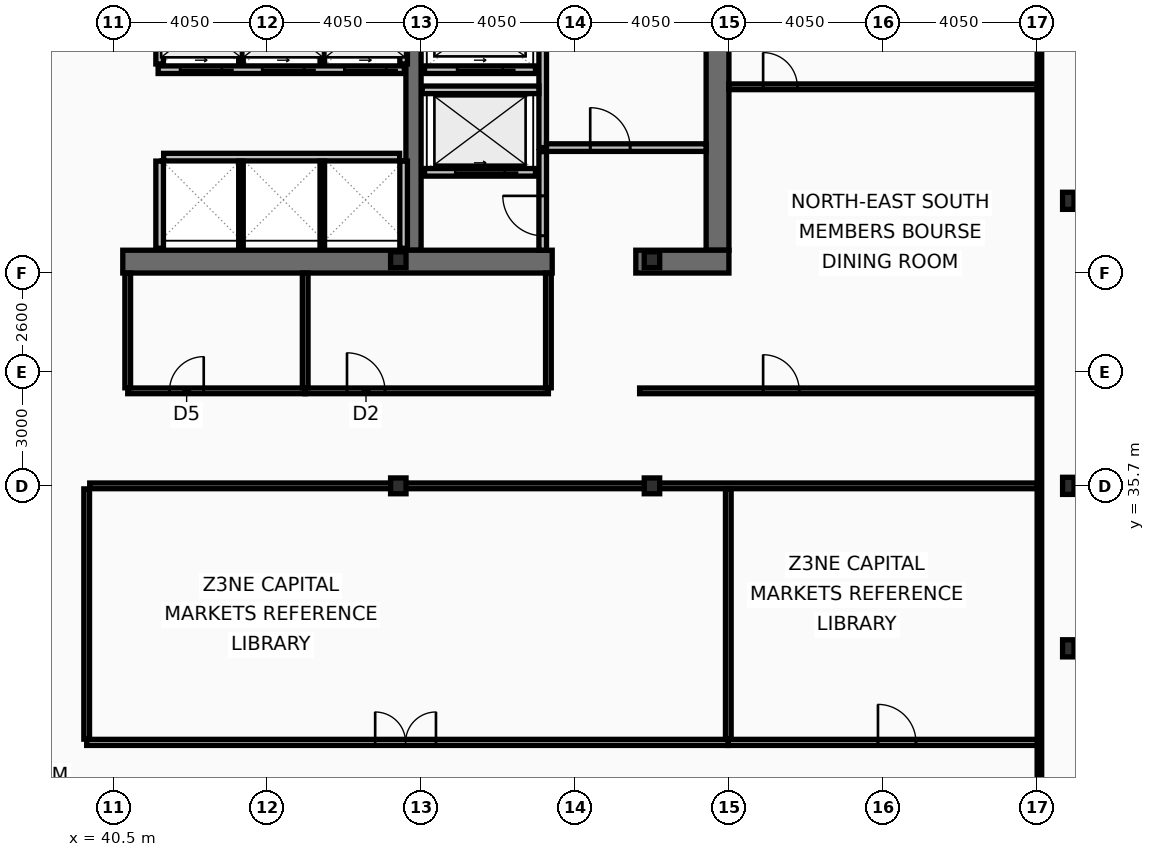
"""IFC4 building model, lengths in metres.
Left out: names, types, materials, properties, quantities, classifications, styles, units other than length and angle.
Written with IfcOpenShell. Run it as: python <this file> out.ifc"""

import sys

from ifc_helpers import new_model, si_unit, direction, frame, frame_2d, origin, origin_2d, place, context, subcontext, project, spatial, rectangle, i_section, extrude, element, fill, save


model = new_model("IFC4")
c1 = context("Model", 3, precision=1e-05, world=origin(), true_north=direction((0.0, 1.0)))
c2 = subcontext(c1, "Body", "Model", "MODEL_VIEW")
j1 = project(units=[si_unit("LENGTHUNIT", "METRE"), si_unit("PLANEANGLEUNIT", "RADIAN")], contexts=[c1])
p1 = place(None, origin())
s1 = spatial("IfcSite", under=j1, at=p1, CompositionType="ELEMENT")
p2 = place(p1, origin())
s2 = spatial("IfcBuilding", under=s1, at=p2, CompositionType="ELEMENT")
p3 = place(p2, frame((0.0, 0.0, 235.4)))
s3 = spatial("IfcBuildingStorey", under=s2, at=p3, CompositionType="ELEMENT", Elevation=235.4)
p4 = place(p3, frame((56.4, 53.1, 0.0), z_axis=(0.0, 0.0, 1.0), x_axis=(0.0, -1.0, 0.0)))
e1 = element("IfcWall", 1, at=p4, inside=s3, PredefinedType="SHEAR", context=c2, shape_type="SweptSolid", body=[
    extrude(rectangle(XDim=11.2, YDim=0.6, at=frame_2d((5.6, 0.0))), origin(), (0.0, 0.0, 1.0), 3.44),
])
p5 = place(p3, frame((48.4, 41.9, 0.0), z_axis=(0.0, 0.0, 1.0), x_axis=(0.0, 1.0, 0.0)))
e2 = element("IfcWall", 2, at=p5, inside=s3, PredefinedType="SHEAR", context=c2, shape_type="SweptSolid", body=[
    extrude(rectangle(XDim=11.2, YDim=0.4, at=frame_2d((5.6, 0.0))), origin(), (0.0, 0.0, 1.0), 3.44),
])
p6 = place(p3, frame((52.05, 41.6, 0.0), z_axis=(0.0, 0.0, 1.0), x_axis=(-1.0, 0.0, 0.0)))
e3 = element("IfcWall", 3, at=p6, inside=s3, PredefinedType="SHEAR", context=c2, shape_type="SweptSolid", body=[
    extrude(rectangle(XDim=11.3, YDim=0.6, at=frame_2d((5.65, 0.0))), origin(), (0.0, 0.0, 1.0), 3.44),
])
p7 = place(p3, frame((56.7, 41.6, 0.0), z_axis=(0.0, 0.0, 1.0), x_axis=(-1.0, 0.0, 0.0)))
e4 = element("IfcWall", 4, at=p7, inside=s3, PredefinedType="SHEAR", context=c2, shape_type="SweptSolid", body=[
    extrude(rectangle(XDim=2.45, YDim=0.6, at=frame_2d((1.225, 0.0))), origin(), (0.0, 0.0, 1.0), 3.44),
])
for number, where, z_axis, x_axis in (
    (5, (65.63, 31.425, 0.0), (0.0, 0.0, 1.0), (1.0, 0.0, 0.0)),
    (6, (65.63, 35.7, 0.0), (0.0, 0.0, 1.0), (1.0, 0.0, 0.0)),
    (7, (65.63, 43.2, 0.0), (0.0, 0.0, 1.0), (1.0, 0.0, 0.0)),
):
    element("IfcColumn", number, at=place(p3, frame(where, z_axis=z_axis, x_axis=x_axis)), inside=s3, PredefinedType="COLUMN", context=c2, shape_type="SweptSolid", body=[
        extrude(i_section(OverallWidth=0.3, OverallDepth=0.45, WebThickness=0.014, FlangeThickness=0.026, at=origin_2d()), origin(), (0.0, 0.0, 1.0), 3.6),
    ])
for number, where, z_axis, x_axis in (
    (8, (48.0, 35.7, 0.0), (0.0, 0.0, 1.0), (1.0, 0.0, 0.0)),
    (9, (48.0, 41.65, 0.0), (0.0, 0.0, 1.0), (1.0, 0.0, 0.0)),
    (10, (54.675, 35.7, 0.0), (0.0, 0.0, 1.0), (1.0, 0.0, 0.0)),
    (11, (54.675, 41.65, 0.0), (0.0, 0.0, 1.0), (1.0, 0.0, 0.0)),
):
    element("IfcColumn", number, at=place(p3, frame(where, z_axis=z_axis, x_axis=x_axis)), inside=s3, PredefinedType="COLUMN", context=c2, shape_type="SweptSolid", body=[
        extrude(i_section(OverallWidth=0.406, OverallDepth=0.416, WebThickness=0.03, FlangeThickness=0.048, at=origin_2d()), origin(), (0.0, 0.0, 1.0), 3.6),
    ])
p8 = place(p3, frame((51.61, 43.95, 0.0), z_axis=(0.0, 0.0, 1.0), x_axis=(-1.0, 0.0, 0.0)))
e12 = element("IfcWall", 12, at=p8, inside=s3, PredefinedType="PARTITIONING", context=c2, shape_type="SweptSolid", body=[
    extrude(rectangle(XDim=2.92, YDim=0.2, at=frame_2d((1.46, 0.0))), origin(), (0.0, 0.0, 1.0), 3.44),
])
p9 = place(p8, frame((0.81, 0.0, 0.0)))
e13 = element("IfcOpeningElement", 13, at=p9, cuts=e12, PredefinedType="OPENING", context=c2, shape_type="SweptSolid", body=[
    extrude(rectangle(XDim=1.3, YDim=2.18, at=frame_2d((0.65, 1.09))), frame((0.0, 0.11, 0.0), z_axis=(0.0, -1.0, 0.0), x_axis=(1.0, 0.0, 0.0)), (0.0, 0.0, 1.0), 0.22),
])
p10 = place(p3, frame((51.61, 46.65, 0.0), z_axis=(0.0, 0.0, 1.0), x_axis=(-1.0, 0.0, 0.0)))
e14 = element("IfcWall", 14, at=p10, inside=s3, PredefinedType="PARTITIONING", context=c2, shape_type="SweptSolid", body=[
    extrude(rectangle(XDim=2.92, YDim=0.2, at=frame_2d((1.46, 0.0))), origin(), (0.0, 0.0, 1.0), 3.44),
])
p11 = place(p10, frame((0.86, 0.0, 0.0)))
e15 = element("IfcOpeningElement", 15, at=p11, cuts=e14, PredefinedType="OPENING", context=c2, shape_type="SweptSolid", body=[
    extrude(rectangle(XDim=1.2, YDim=2.18, at=frame_2d((0.6, 1.09))), frame((0.0, 0.11, 0.0), z_axis=(0.0, -1.0, 0.0), x_axis=(1.0, 0.0, 0.0)), (0.0, 0.0, 1.0), 0.22),
])
p12 = place(p3, frame((48.16, 46.65, 0.0), z_axis=(0.0, 0.0, 1.0), x_axis=(-1.0, 0.0, 0.0)))
e16 = element("IfcWall", 16, at=p12, inside=s3, PredefinedType="PARTITIONING", context=c2, shape_type="SweptSolid", body=[
    extrude(rectangle(XDim=6.48, YDim=0.2, at=frame_2d((3.24, 0.0))), origin(), (0.0, 0.0, 1.0), 3.44),
])
p13 = place(p12, frame((4.8, 0.0, 0.0)))
e17 = element("IfcOpeningElement", 17, at=p13, cuts=e16, PredefinedType="OPENING", context=c2, shape_type="SweptSolid", body=[
    extrude(rectangle(XDim=1.1, YDim=2.18, at=frame_2d((0.55, 1.09))), frame((0.0, 0.11, 0.0), z_axis=(0.0, -1.0, 0.0), x_axis=(1.0, 0.0, 0.0)), (0.0, 0.0, 1.0), 0.22),
])
p14 = place(p12, frame((2.64, 0.0, 0.0)))
e18 = element("IfcOpeningElement", 18, at=p14, cuts=e16, PredefinedType="OPENING", context=c2, shape_type="SweptSolid", body=[
    extrude(rectangle(XDim=1.1, YDim=2.18, at=frame_2d((0.55, 1.09))), frame((0.0, 0.11, 0.0), z_axis=(0.0, -1.0, 0.0), x_axis=(1.0, 0.0, 0.0)), (0.0, 0.0, 1.0), 0.22),
])
p15 = place(p12, frame((0.48, 0.0, 0.0)))
e19 = element("IfcOpeningElement", 19, at=p15, cuts=e16, PredefinedType="OPENING", context=c2, shape_type="SweptSolid", body=[
    extrude(rectangle(XDim=1.1, YDim=2.18, at=frame_2d((0.55, 1.09))), frame((0.0, 0.11, 0.0), z_axis=(0.0, -1.0, 0.0), x_axis=(1.0, 0.0, 0.0)), (0.0, 0.0, 1.0), 0.22),
])
p16 = place(p3, frame((51.8, 44.6, 0.0), z_axis=(0.0, 0.0, 1.0), x_axis=(0.0, 1.0, 0.0)))
e20 = element("IfcWall", 20, at=p16, inside=s3, PredefinedType="PARTITIONING", context=c2, shape_type="SweptSolid", body=[
    extrude(rectangle(XDim=4.3, YDim=0.2, at=frame_2d((2.15, 0.0))), origin(), (0.0, 0.0, 1.0), 3.44),
])
p17 = place(p3, frame((51.9, 44.6, 0.0), z_axis=(0.0, 0.0, 1.0), x_axis=(1.0, 0.0, 0.0)))
e21 = element("IfcWall", 21, at=p17, inside=s3, PredefinedType="PARTITIONING", context=c2, shape_type="SweptSolid", body=[
    extrude(rectangle(XDim=4.2, YDim=0.2, at=frame_2d((2.1, 0.0))), origin(), (0.0, 0.0, 1.0), 3.44),
])
p18 = place(p17, frame((1.15, 0.0, 0.0)))
e22 = element("IfcOpeningElement", 22, at=p18, cuts=e21, PredefinedType="OPENING", context=c2, shape_type="SweptSolid", body=[
    extrude(rectangle(XDim=1.05, YDim=2.15, at=frame_2d((0.525, 1.075))), frame((0.0, 0.11, 0.0), z_axis=(0.0, -1.0, 0.0), x_axis=(1.0, 0.0, 0.0)), (0.0, 0.0, 1.0), 0.22),
])
p19 = place(p3, frame((48.63, 46.12, 0.0), z_axis=(0.0, 0.0, 1.0), x_axis=(1.0, 0.0, 0.0)))
e23 = element("IfcWall", 23, at=p19, inside=s3, PredefinedType="PARTITIONING", context=c2, shape_type="SweptSolid", body=[
    extrude(rectangle(XDim=3.07, YDim=0.2, at=frame_2d((1.535, 0.0))), origin(), (0.0, 0.0, 1.0), 3.44),
])
p20 = place(p3, frame((51.8, 41.9, 0.0), z_axis=(0.0, 0.0, 1.0), x_axis=(0.0, 1.0, 0.0)))
e24 = element("IfcWall", 24, at=p20, inside=s3, PredefinedType="PARTITIONING", context=c2, shape_type="SweptSolid", body=[
    extrude(rectangle(XDim=2.595, YDim=0.2, at=frame_2d((1.298, 0.0))), origin(), (0.0, 0.0, 1.0), 3.44),
])
p21 = place(p20, frame((0.38, 0.0, 0.0)))
e25 = element("IfcOpeningElement", 25, at=p21, cuts=e24, PredefinedType="OPENING", context=c2, shape_type="SweptSolid", body=[
    extrude(rectangle(XDim=1.05, YDim=2.15, at=frame_2d((0.525, 1.075))), frame((0.0, 0.11, 0.0), z_axis=(0.0, -1.0, 0.0), x_axis=(1.0, 0.0, 0.0)), (0.0, 0.0, 1.0), 0.22),
])
for number, where, z_axis, x_axis in (
    (26, (41.72, 46.8, 0.0), (0.0, 0.0, 1.0), (0.0, 1.0, 0.0)),
    (27, (48.14, 46.8, 0.0), (0.0, 0.0, 1.0), (0.0, 1.0, 0.0)),
):
    element("IfcWall", number, at=place(p3, frame(where, z_axis=z_axis, x_axis=x_axis)), inside=s3, PredefinedType="PARTITIONING", context=c2, shape_type="SweptSolid", body=[
        extrude(rectangle(XDim=2.095, YDim=0.2, at=frame_2d((1.047, 0.0))), origin(), (0.0, 0.0, 1.0), 3.44),
    ])
for number, where, z_axis, x_axis in (
    (28, (43.86, 46.8, 0.0), (0.0, 0.0, 1.0), (0.0, 1.0, 0.0)),
    (29, (46.0, 46.8, 0.0), (0.0, 0.0, 1.0), (0.0, 1.0, 0.0)),
):
    element("IfcWall", number, at=place(p3, frame(where, z_axis=z_axis, x_axis=x_axis)), inside=s3, PredefinedType="PARTITIONING", context=c2, shape_type="SweptSolid", body=[
        extrude(rectangle(XDim=2.095, YDim=0.12, at=frame_2d((1.047, 0.0))), origin(), (0.0, 0.0, 1.0), 3.44),
    ])
p22 = place(p3, frame((41.825, 44.35, 0.0), z_axis=(0.0, 0.0, 1.0), x_axis=(1.0, 0.0, 0.0)))
e30 = element("IfcWall", 30, at=p22, inside=s3, PredefinedType="PARTITIONING", context=c2, shape_type="SweptSolid", body=[
    extrude(rectangle(XDim=6.21, YDim=0.2, at=frame_2d((3.105, 0.0))), origin(), (0.0, 0.0, 1.0), 3.44),
])
for number, where, z_axis, x_axis in (
    (31, (41.72, 41.95, 0.0), (0.0, 0.0, 1.0), (0.0, 1.0, 0.0)),
    (32, (48.14, 41.95, 0.0), (0.0, 0.0, 1.0), (0.0, 1.0, 0.0)),
):
    element("IfcWall", number, at=place(p3, frame(where, z_axis=z_axis, x_axis=x_axis)), inside=s3, PredefinedType="PARTITIONING", context=c2, shape_type="SweptSolid", body=[
        extrude(rectangle(XDim=2.295, YDim=0.2, at=frame_2d((1.147, 0.0))), origin(), (0.0, 0.0, 1.0), 3.44),
    ])
for number, where, z_axis, x_axis in (
    (33, (43.86, 41.95, 0.0), (0.0, 0.0, 1.0), (0.0, 1.0, 0.0)),
    (34, (46.0, 41.95, 0.0), (0.0, 0.0, 1.0), (0.0, 1.0, 0.0)),
):
    element("IfcWall", number, at=place(p3, frame(where, z_axis=z_axis, x_axis=x_axis)), inside=s3, PredefinedType="PARTITIONING", context=c2, shape_type="SweptSolid", body=[
        extrude(rectangle(XDim=2.295, YDim=0.12, at=frame_2d((1.147, 0.0))), origin(), (0.0, 0.0, 1.0), 3.44),
    ])
p23 = place(p3, frame((40.88, 38.2, 0.0), z_axis=(0.0, 0.0, 1.0), x_axis=(1.0, 0.0, 0.0)))
e35 = element("IfcWall", 35, at=p23, inside=s3, PredefinedType="PARTITIONING", context=c2, shape_type="SweptSolid", body=[
    extrude(rectangle(XDim=4.67, YDim=0.15, at=frame_2d((2.335, 0.0))), origin(), (0.0, 0.0, 1.0), 2.78),
])
p24 = place(p23, frame((1.1, 0.0, 0.0)))
e36 = element("IfcOpeningElement", 36, at=p24, cuts=e35, PredefinedType="OPENING", context=c2, shape_type="SweptSolid", body=[
    extrude(rectangle(XDim=0.9, YDim=2.05, at=frame_2d((0.45, 1.025))), frame((0.0, 0.085, 0.0), z_axis=(0.0, -1.0, 0.0), x_axis=(1.0, 0.0, 0.0)), (0.0, 0.0, 1.0), 0.17),
])
p25 = place(p3, frame((45.55, 38.2, 0.0), z_axis=(0.0, 0.0, 1.0), x_axis=(1.0, 0.0, 0.0)))
e37 = element("IfcWall", 37, at=p25, inside=s3, PredefinedType="PARTITIONING", context=c2, shape_type="SweptSolid", body=[
    extrude(rectangle(XDim=6.4, YDim=0.15, at=frame_2d((3.2, 0.0))), origin(), (0.0, 0.0, 1.0), 2.78),
])
p26 = place(p25, frame((1.1, 0.0, 0.0)))
e38 = element("IfcOpeningElement", 38, at=p26, cuts=e37, PredefinedType="OPENING", context=c2, shape_type="SweptSolid", body=[
    extrude(rectangle(XDim=1.0, YDim=2.05, at=frame_2d((0.5, 1.025))), frame((0.0, 0.085, 0.0), z_axis=(0.0, -1.0, 0.0), x_axis=(1.0, 0.0, 0.0)), (0.0, 0.0, 1.0), 0.17),
])
for number, where, z_axis, x_axis in (
    (39, (40.88, 38.28, 0.0), (0.0, 0.0, 1.0), (0.0, 1.0, 0.0)),
    (40, (45.55, 38.28, 0.0), (0.0, 0.0, 1.0), (0.0, 1.0, 0.0)),
    (41, (51.95, 38.28, 0.0), (0.0, 0.0, 1.0), (0.0, 1.0, 0.0)),
):
    element("IfcWall", number, at=place(p3, frame(where, z_axis=z_axis, x_axis=x_axis)), inside=s3, PredefinedType="PARTITIONING", context=c2, shape_type="SweptSolid", body=[
        extrude(rectangle(XDim=3.02, YDim=0.15, at=frame_2d((1.51, 0.0))), origin(), (0.0, 0.0, 1.0), 3.44),
    ])
p27 = place(p3, frame((54.35, 38.2, 0.0), z_axis=(0.0, 0.0, 1.0), x_axis=(1.0, 0.0, 0.0)))
e42 = element("IfcWall", 42, at=p27, inside=s3, PredefinedType="PARTITIONING", context=c2, shape_type="SweptSolid", body=[
    extrude(rectangle(XDim=10.52, YDim=0.15, at=frame_2d((5.26, 0.0))), origin(), (0.0, 0.0, 1.0), 2.78),
])
p28 = place(p27, frame((3.25, 0.0, 0.0)))
e43 = element("IfcOpeningElement", 43, at=p28, cuts=e42, PredefinedType="OPENING", context=c2, shape_type="SweptSolid", body=[
    extrude(rectangle(XDim=0.95, YDim=2.05, at=frame_2d((0.475, 1.025))), frame((0.0, 0.085, 0.0), z_axis=(0.0, -1.0, 0.0), x_axis=(1.0, 0.0, 0.0)), (0.0, 0.0, 1.0), 0.17),
])
p29 = place(p3, frame((56.7, 46.2, 0.0), z_axis=(0.0, 0.0, 1.0), x_axis=(1.0, 0.0, 0.0)))
e44 = element("IfcWall", 44, at=p29, inside=s3, PredefinedType="PARTITIONING", context=c2, shape_type="SweptSolid", body=[
    extrude(rectangle(XDim=8.105, YDim=0.15, at=frame_2d((4.052, 0.0))), origin(), (0.0, 0.0, 1.0), 2.83),
])
p30 = place(p29, frame((0.9, 0.0, 0.0)))
e45 = element("IfcOpeningElement", 45, at=p30, cuts=e44, PredefinedType="OPENING", context=c2, shape_type="SweptSolid", body=[
    extrude(rectangle(XDim=0.9, YDim=2.05, at=frame_2d((0.45, 1.025))), frame((0.0, 0.085, 0.0), z_axis=(0.0, -1.0, 0.0), x_axis=(1.0, 0.0, 0.0)), (0.0, 0.0, 1.0), 0.17),
])
p31 = place(p3, frame((39.8, 29.035, 0.0), z_axis=(0.0, 0.0, 1.0), x_axis=(0.0, 1.0, 0.0)))
e46 = element("IfcWall", 46, at=p31, inside=s3, PredefinedType="PARTITIONING", context=c2, shape_type="SweptSolid", body=[
    extrude(rectangle(XDim=6.585, YDim=0.15, at=frame_2d((3.292, 0.0))), origin(), (0.0, 0.0, 1.0), 2.98),
])
p32 = place(p3, frame((39.88, 35.7, 0.0), z_axis=(0.0, 0.0, 1.0), x_axis=(1.0, 0.0, 0.0)))
e47 = element("IfcWall", 47, at=p32, inside=s3, PredefinedType="PARTITIONING", context=c2, shape_type="SweptSolid", body=[
    extrude(rectangle(XDim=24.925, YDim=0.15, at=frame_2d((12.462, 0.0))), origin(), (0.0, 0.0, 1.0), 2.09),
])
p33 = place(p3, frame((39.8, 28.95, 0.0), z_axis=(0.0, 0.0, 1.0), x_axis=(1.0, 0.0, 0.0)))
e48 = element("IfcWall", 48, at=p33, inside=s3, PredefinedType="PARTITIONING", context=c2, shape_type="SweptSolid", body=[
    extrude(rectangle(XDim=16.884, YDim=0.16, at=frame_2d((8.442, 0.0))), origin(), (0.0, 0.0, 1.0), 2.53),
])
p34 = place(p33, frame((7.591, 0.0, 0.0)))
e49 = element("IfcOpeningElement", 49, at=p34, cuts=e48, PredefinedType="OPENING", context=c2, shape_type="SweptSolid", body=[
    extrude(rectangle(XDim=1.6, YDim=2.15, at=frame_2d((0.8, 1.075))), frame((0.0, 0.09, 0.0), z_axis=(0.0, -1.0, 0.0), x_axis=(1.0, 0.0, 0.0)), (0.0, 0.0, 1.0), 0.18),
])
p35 = place(p3, frame((56.684, 28.95, 0.0), z_axis=(0.0, 0.0, 1.0), x_axis=(1.0, 0.0, 0.0)))
e50 = element("IfcWall", 50, at=p35, inside=s3, PredefinedType="PARTITIONING", context=c2, shape_type="SweptSolid", body=[
    extrude(rectangle(XDim=8.186, YDim=0.16, at=frame_2d((4.093, 0.0))), origin(), (0.0, 0.0, 1.0), 2.83),
])
p36 = place(p35, frame((3.938, 0.0, 0.0)))
e51 = element("IfcOpeningElement", 51, at=p36, cuts=e50, PredefinedType="OPENING", context=c2, shape_type="SweptSolid", body=[
    extrude(rectangle(XDim=1.0, YDim=2.05, at=frame_2d((0.5, 1.025))), frame((0.0, 0.09, 0.0), z_axis=(0.0, -1.0, 0.0), x_axis=(1.0, 0.0, 0.0)), (0.0, 0.0, 1.0), 0.18),
])
p37 = place(p3, frame((56.684, 29.035, 0.0), z_axis=(0.0, 0.0, 1.0), x_axis=(0.0, 1.0, 0.0)))
e52 = element("IfcWall", 52, at=p37, inside=s3, PredefinedType="PARTITIONING", context=c2, shape_type="SweptSolid", body=[
    extrude(rectangle(XDim=6.585, YDim=0.15, at=frame_2d((3.292, 0.0))), origin(), (0.0, 0.0, 1.0), 2.11),
])
p38 = place(p3, frame((64.87, 10.665, 0.0), z_axis=(0.0, 0.0, 1.0), x_axis=(0.0, 1.0, 0.0)))
e53 = element("IfcWall", 53, at=p38, inside=s3, PredefinedType="PARTITIONING", context=c2, shape_type="SweptSolid", body=[
    extrude(rectangle(XDim=42.11, YDim=0.12, at=frame_2d((21.055, 0.0))), origin(), (0.0, 0.0, 1.0), 1.83),
])
p39 = place(p9, origin())
e54 = element("IfcDoor", 54, at=p39, inside=s3, OperationType="SLIDING_TO_LEFT", PredefinedType="DOOR", context=c2, shape_type="SweptSolid", body=[
    extrude(rectangle(XDim=1.3, YDim=2.18, at=frame_2d((0.65, 1.09))), frame((0.0, 0.025, 0.0), z_axis=(0.0, -1.0, 0.0), x_axis=(1.0, 0.0, 0.0)), (0.0, 0.0, 1.0), 0.05),
])
fill(e13, e54)
p40 = place(p11, origin())
e55 = element("IfcDoor", 55, at=p40, inside=s3, OperationType="SLIDING_TO_LEFT", PredefinedType="DOOR", context=c2, shape_type="SweptSolid", body=[
    extrude(rectangle(XDim=1.2, YDim=2.18, at=frame_2d((0.6, 1.09))), frame((0.0, 0.025, 0.0), z_axis=(0.0, -1.0, 0.0), x_axis=(1.0, 0.0, 0.0)), (0.0, 0.0, 1.0), 0.05),
])
fill(e15, e55)
p41 = place(p13, origin())
e56 = element("IfcDoor", 56, at=p41, inside=s3, OperationType="SLIDING_TO_LEFT", PredefinedType="DOOR", context=c2, shape_type="SweptSolid", body=[
    extrude(rectangle(XDim=1.1, YDim=2.18, at=frame_2d((0.55, 1.09))), frame((0.0, 0.025, 0.0), z_axis=(0.0, -1.0, 0.0), x_axis=(1.0, 0.0, 0.0)), (0.0, 0.0, 1.0), 0.05),
])
fill(e17, e56)
p42 = place(p14, origin())
e57 = element("IfcDoor", 57, at=p42, inside=s3, OperationType="SLIDING_TO_LEFT", PredefinedType="DOOR", context=c2, shape_type="SweptSolid", body=[
    extrude(rectangle(XDim=1.1, YDim=2.18, at=frame_2d((0.55, 1.09))), frame((0.0, 0.025, 0.0), z_axis=(0.0, -1.0, 0.0), x_axis=(1.0, 0.0, 0.0)), (0.0, 0.0, 1.0), 0.05),
])
fill(e18, e57)
p43 = place(p15, origin())
e58 = element("IfcDoor", 58, at=p43, inside=s3, OperationType="SLIDING_TO_LEFT", PredefinedType="DOOR", context=c2, shape_type="SweptSolid", body=[
    extrude(rectangle(XDim=1.1, YDim=2.18, at=frame_2d((0.55, 1.09))), frame((0.0, 0.025, 0.0), z_axis=(0.0, -1.0, 0.0), x_axis=(1.0, 0.0, 0.0)), (0.0, 0.0, 1.0), 0.05),
])
fill(e19, e58)
p44 = place(p18, origin())
e59 = element("IfcDoor", 59, at=p44, inside=s3, OperationType="SINGLE_SWING_LEFT", PredefinedType="DOOR", context=c2, shape_type="SweptSolid", body=[
    extrude(rectangle(XDim=1.05, YDim=2.15, at=frame_2d((0.525, 1.075))), frame((0.0, 0.025, 0.0), z_axis=(0.0, -1.0, 0.0), x_axis=(1.0, 0.0, 0.0)), (0.0, 0.0, 1.0), 0.05),
])
fill(e22, e59)
p45 = place(p21, origin())
e60 = element("IfcDoor", 60, at=p45, inside=s3, OperationType="SINGLE_SWING_RIGHT", PredefinedType="DOOR", context=c2, shape_type="SweptSolid", body=[
    extrude(rectangle(XDim=1.05, YDim=2.15, at=frame_2d((0.525, 1.075))), frame((0.0, 0.025, 0.0), z_axis=(0.0, -1.0, 0.0), x_axis=(1.0, 0.0, 0.0)), (0.0, 0.0, 1.0), 0.05),
])
fill(e25, e60)
p46 = place(p24, origin())
e61 = element("IfcDoor", 61, at=p46, inside=s3, OperationType="SINGLE_SWING_RIGHT", PredefinedType="DOOR", context=c2, shape_type="SweptSolid", body=[
    extrude(rectangle(XDim=0.9, YDim=2.05, at=frame_2d((0.45, 1.025))), frame((0.0, 0.025, 0.0), z_axis=(0.0, -1.0, 0.0), x_axis=(1.0, 0.0, 0.0)), (0.0, 0.0, 1.0), 0.05),
])
fill(e36, e61)
p47 = place(p26, origin())
e62 = element("IfcDoor", 62, at=p47, inside=s3, OperationType="SINGLE_SWING_LEFT", PredefinedType="DOOR", context=c2, shape_type="SweptSolid", body=[
    extrude(rectangle(XDim=1.0, YDim=2.05, at=frame_2d((0.5, 1.025))), frame((0.0, 0.025, 0.0), z_axis=(0.0, -1.0, 0.0), x_axis=(1.0, 0.0, 0.0)), (0.0, 0.0, 1.0), 0.05),
])
fill(e38, e62)
p48 = place(p28, origin())
e63 = element("IfcDoor", 63, at=p48, inside=s3, OperationType="SINGLE_SWING_LEFT", PredefinedType="DOOR", context=c2, shape_type="SweptSolid", body=[
    extrude(rectangle(XDim=0.95, YDim=2.05, at=frame_2d((0.475, 1.025))), frame((0.0, 0.025, 0.0), z_axis=(0.0, -1.0, 0.0), x_axis=(1.0, 0.0, 0.0)), (0.0, 0.0, 1.0), 0.05),
])
fill(e43, e63)
p49 = place(p30, origin())
e64 = element("IfcDoor", 64, at=p49, inside=s3, OperationType="SINGLE_SWING_LEFT", PredefinedType="DOOR", context=c2, shape_type="SweptSolid", body=[
    extrude(rectangle(XDim=0.9, YDim=2.05, at=frame_2d((0.45, 1.025))), frame((0.0, 0.025, 0.0), z_axis=(0.0, -1.0, 0.0), x_axis=(1.0, 0.0, 0.0)), (0.0, 0.0, 1.0), 0.05),
])
fill(e45, e64)
p50 = place(p34, origin())
e65 = element("IfcDoor", 65, at=p50, inside=s3, OperationType="DOUBLE_DOOR_SINGLE_SWING", PredefinedType="DOOR", context=c2, shape_type="SweptSolid", body=[
    extrude(rectangle(XDim=1.6, YDim=2.15, at=frame_2d((0.8, 1.075))), frame((0.0, 0.025, 0.0), z_axis=(0.0, -1.0, 0.0), x_axis=(1.0, 0.0, 0.0)), (0.0, 0.0, 1.0), 0.05),
])
fill(e49, e65)
p51 = place(p36, origin())
e66 = element("IfcDoor", 66, at=p51, inside=s3, OperationType="SINGLE_SWING_LEFT", PredefinedType="DOOR", context=c2, shape_type="SweptSolid", body=[
    extrude(rectangle(XDim=1.0, YDim=2.05, at=frame_2d((0.5, 1.025))), frame((0.0, 0.025, 0.0), z_axis=(0.0, -1.0, 0.0), x_axis=(1.0, 0.0, 0.0)), (0.0, 0.0, 1.0), 0.05),
])
fill(e51, e66)
save(model, sys.argv[1])
